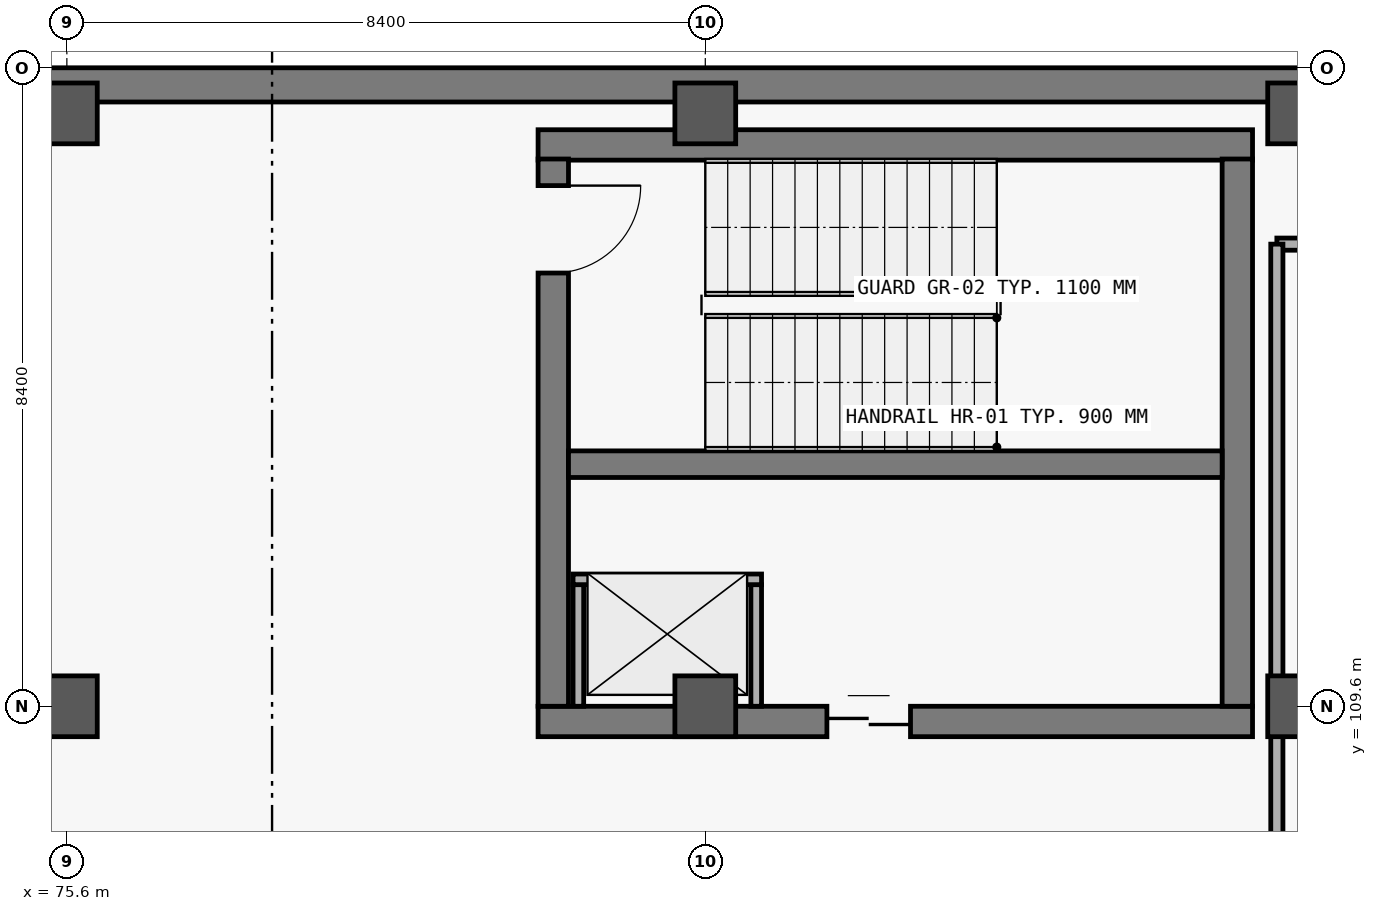
"""IFC4 building model, lengths in metres.
Left out: names, types, materials, properties, quantities, classifications, styles, units other than length and angle.
Written with IfcOpenShell. Run it as: python <this file> out.ifc"""

import sys

from ifc_helpers import new_model, si_unit, direction, frame, frame_2d, origin, origin_2d, place, context, subcontext, project, spatial, rectangle, extrude, element, fill, save


model = new_model("IFC4")
c1 = context("Model", 3, precision=1e-05, world=origin(), true_north=direction((0.0, 1.0)))
c2 = subcontext(c1, "Body", "Model", "MODEL_VIEW")
j1 = project(units=[si_unit("LENGTHUNIT", "METRE"), si_unit("PLANEANGLEUNIT", "RADIAN")], contexts=[c1])
p1 = place(None, origin())
s1 = spatial("IfcSite", under=j1, at=p1, CompositionType="ELEMENT")
p2 = place(p1, origin())
s2 = spatial("IfcBuilding", under=s1, at=p2, CompositionType="ELEMENT")
p3 = place(p2, frame((0.0, 0.0, -4.8)))
s3 = spatial("IfcBuildingStorey", under=s2, at=p3, CompositionType="ELEMENT", Elevation=-4.8)
p4 = place(p3, frame((8.85, 117.775, 0.0), z_axis=(0.0, 0.0, 1.0), x_axis=(1.0, 0.0, 0.0)))
e1 = element("IfcWall", 1, at=p4, inside=s3, PredefinedType="USERDEFINED", context=c2, shape_type="SweptSolid", body=[
    extrude(rectangle(XDim=133.35, YDim=0.45, at=frame_2d((66.675, 0.0))), origin(), (0.0, 0.0, 1.0), 4.48),
])
for number, where, z_axis, x_axis in (
    (2, (75.6, 109.6, 0.0), (0.0, 0.0, 1.0), (1.0, 0.0, 0.0)),
    (3, (75.6, 117.4, 0.0), (0.0, 0.0, 1.0), (1.0, 0.0, 0.0)),
    (4, (84.0, 109.6, 0.0), (0.0, 0.0, 1.0), (1.0, 0.0, 0.0)),
    (5, (84.0, 117.4, 0.0), (0.0, 0.0, 1.0), (1.0, 0.0, 0.0)),
    (6, (91.8, 109.6, 0.0), (0.0, 0.0, 1.0), (1.0, 0.0, 0.0)),
    (7, (91.8, 117.4, 0.0), (0.0, 0.0, 1.0), (1.0, 0.0, 0.0)),
):
    element("IfcColumn", number, at=place(p3, frame(where, z_axis=z_axis, x_axis=x_axis)), inside=s3, PredefinedType="COLUMN", context=c2, shape_type="SweptSolid", body=[
        extrude(rectangle(XDim=0.8, YDim=0.8, at=origin_2d()), origin(), (0.0, 0.0, 1.0), 4.8),
    ])
p5 = place(p3, frame((81.8, 109.4, 0.0), z_axis=(0.0, 0.0, 1.0), x_axis=(1.0, 0.0, 0.0)))
e8 = element("IfcWall", 8, at=p5, inside=s3, PredefinedType="SHEAR", context=c2, shape_type="SweptSolid", body=[
    extrude(rectangle(XDim=9.4, YDim=0.4, at=frame_2d((4.7, 0.0))), origin(), (0.0, 0.0, 1.0), 4.48),
])
p6 = place(p5, frame((3.8, 0.0, 0.0)))
e9 = element("IfcOpeningElement", 9, at=p6, cuts=e8, PredefinedType="OPENING", context=c2, shape_type="SweptSolid", body=[
    extrude(rectangle(XDim=1.1, YDim=2.2, at=frame_2d((0.55, 1.1))), frame((0.0, 0.21, 0.0), z_axis=(0.0, -1.0, 0.0), x_axis=(1.0, 0.0, 0.0)), (0.0, 0.0, 1.0), 0.42),
])
p7 = place(p3, frame((91.2, 116.985, 0.0), z_axis=(0.0, 0.0, 1.0), x_axis=(-1.0, 0.0, 0.0)))
e10 = element("IfcWall", 10, at=p7, inside=s3, PredefinedType="SHEAR", context=c2, shape_type="SweptSolid", body=[
    extrude(rectangle(XDim=9.4, YDim=0.4, at=frame_2d((4.7, 0.0))), origin(), (0.0, 0.0, 1.0), 4.48),
])
p8 = place(p3, frame((82.0, 116.8, 0.0), z_axis=(0.0, 0.0, 1.0), x_axis=(0.0, -1.0, 0.0)))
e11 = element("IfcWall", 11, at=p8, inside=s3, PredefinedType="SHEAR", context=c2, shape_type="SweptSolid", body=[
    extrude(rectangle(XDim=7.2, YDim=0.4, at=frame_2d((3.6, 0.0))), origin(), (0.0, 0.0, 1.0), 4.48),
])
p9 = place(p8, frame((0.35, 0.0, 0.0)))
e12 = element("IfcOpeningElement", 12, at=p9, cuts=e11, PredefinedType="OPENING", context=c2, shape_type="SweptSolid", body=[
    extrude(rectangle(XDim=1.15, YDim=2.2, at=frame_2d((0.575, 1.1))), frame((0.0, 0.21, 0.0), z_axis=(0.0, -1.0, 0.0), x_axis=(1.0, 0.0, 0.0)), (0.0, 0.0, 1.0), 0.42),
])
p10 = place(p3, frame((91.0, 109.6, 0.0), z_axis=(0.0, 0.0, 1.0), x_axis=(0.0, 1.0, 0.0)))
e13 = element("IfcWall", 13, at=p10, inside=s3, PredefinedType="SHEAR", context=c2, shape_type="SweptSolid", body=[
    extrude(rectangle(XDim=7.2, YDim=0.4, at=frame_2d((3.6, 0.0))), origin(), (0.0, 0.0, 1.0), 4.48),
])
p11 = place(p3, frame((82.2, 112.785, 0.0), z_axis=(0.0, 0.0, 1.0), x_axis=(1.0, 0.0, 0.0)))
e14 = element("IfcWall", 14, at=p11, inside=s3, PredefinedType="SHEAR", context=c2, shape_type="SweptSolid", body=[
    extrude(rectangle(XDim=8.6, YDim=0.35, at=frame_2d((4.3, 0.0))), origin(), (0.0, 0.0, 1.0), 4.48),
])
for number, where, z_axis, x_axis in (
    (15, (82.33, 109.6, 0.0), (0.0, 0.0, 1.0), (0.0, 1.0, 0.0)),
    (16, (84.67, 109.6, 0.0), (0.0, 0.0, 1.0), (0.0, 1.0, 0.0)),
):
    element("IfcWall", number, at=place(p3, frame(where, z_axis=z_axis, x_axis=x_axis)), inside=s3, PredefinedType="PARTITIONING", context=c2, shape_type="SweptSolid", body=[
        extrude(rectangle(XDim=1.6, YDim=0.14, at=frame_2d((0.8, 0.0))), origin(), (0.0, 0.0, 1.0), 3.63),
    ])
p12 = place(p3, frame((82.26, 111.27, 0.0), z_axis=(0.0, 0.0, 1.0), x_axis=(1.0, 0.0, 0.0)))
e17 = element("IfcWall", 17, at=p12, inside=s3, PredefinedType="PARTITIONING", context=c2, shape_type="SweptSolid", body=[
    extrude(rectangle(XDim=2.48, YDim=0.14, at=frame_2d((1.24, 0.0))), origin(), (0.0, 0.0, 1.0), 3.63),
])
p13 = place(p3, frame((91.52, 115.68, 0.0), z_axis=(0.0, 0.0, 1.0), x_axis=(1.0, 0.0, 0.0)))
e18 = element("IfcWall", 18, at=p13, inside=s3, PredefinedType="PARTITIONING", context=c2, shape_type="SweptSolid", body=[
    extrude(rectangle(XDim=23.16, YDim=0.16, at=frame_2d((11.58, 0.0))), origin(), (0.0, 0.0, 1.0), 3.58),
])
p14 = place(p3, frame((91.52, 76.12, 0.0), z_axis=(0.0, 0.0, 1.0), x_axis=(0.0, 1.0, 0.0)))
e19 = element("IfcWall", 19, at=p14, inside=s3, PredefinedType="PARTITIONING", context=c2, shape_type="SweptSolid", body=[
    extrude(rectangle(XDim=39.56, YDim=0.16, at=frame_2d((19.78, 0.0))), origin(), (0.0, 0.0, 1.0), 3.58),
])
p15 = place(p9, origin())
e20 = element("IfcDoor", 20, at=p15, inside=s3, OperationType="SINGLE_SWING_LEFT", PredefinedType="DOOR", context=c2, shape_type="SweptSolid", body=[
    extrude(rectangle(XDim=1.15, YDim=2.2, at=frame_2d((0.575, 1.1))), frame((0.0, 0.025, 0.0), z_axis=(0.0, -1.0, 0.0), x_axis=(1.0, 0.0, 0.0)), (0.0, 0.0, 1.0), 0.05),
])
fill(e12, e20)
p16 = place(p6, origin())
e21 = element("IfcDoor", 21, at=p16, inside=s3, OperationType="DOUBLE_DOOR_SLIDING", PredefinedType="DOOR", context=c2, shape_type="SweptSolid", body=[
    extrude(rectangle(XDim=1.1, YDim=2.2, at=frame_2d((0.55, 1.1))), frame((0.0, 0.025, 0.0), z_axis=(0.0, -1.0, 0.0), x_axis=(1.0, 0.0, 0.0)), (0.0, 0.0, 1.0), 0.05),
])
fill(e9, e21)
save(model, sys.argv[1])
